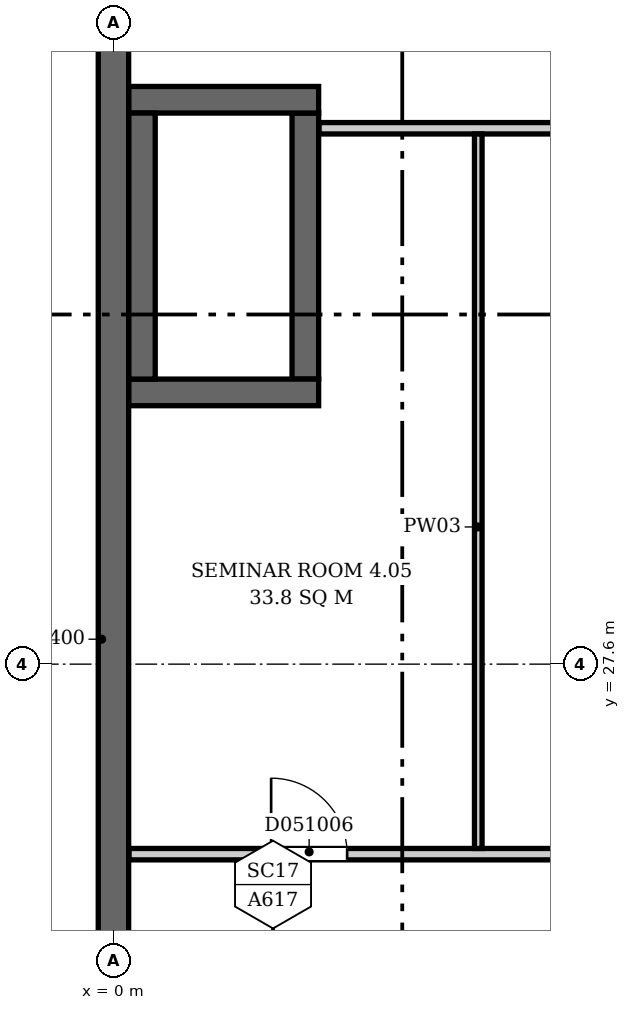
"""IFC4 building model, lengths in metres.
Left out: names, types, materials, properties, quantities, classifications, styles, units other than length and angle.
Written with IfcOpenShell. Run it as: python <this file> out.ifc"""

import sys

from ifc_helpers import new_model, si_unit, direction, frame, frame_2d, origin, place, context, subcontext, project, spatial, rectangle, extrude, element, fill, save


model = new_model("IFC4")
c1 = context("Model", 3, precision=1e-05, world=origin(), true_north=direction((0.0, 1.0)))
c2 = subcontext(c1, "Body", "Model", "MODEL_VIEW")
j1 = project(units=[si_unit("LENGTHUNIT", "METRE"), si_unit("PLANEANGLEUNIT", "RADIAN")], contexts=[c1])
p1 = place(None, origin())
s1 = spatial("IfcSite", under=j1, at=p1, CompositionType="ELEMENT")
p2 = place(p1, origin())
s2 = spatial("IfcBuilding", under=s1, at=p2, CompositionType="ELEMENT")
p3 = place(p2, frame((0.0, 0.0, 26.7)))
s3 = spatial("IfcBuildingStorey", under=s2, at=p3, CompositionType="ELEMENT", Elevation=26.7)
p4 = place(p3, frame((0.0, -0.2, 0.0), z_axis=(0.0, 0.0, 1.0), x_axis=(0.0, 1.0, 0.0)))
e1 = element("IfcWall", 1, at=p4, inside=s3, PredefinedType="SHEAR", context=c2, shape_type="SweptSolid", body=[
    extrude(rectangle(XDim=46.88, YDim=0.4, at=frame_2d((23.44, 0.0))), origin(), (0.0, 0.0, 1.0), 5.2),
])
for number, where, z_axis, x_axis in (
    (2, (0.2, 31.175, 0.0), (0.0, 0.0, 1.0), (1.0, 0.0, 0.0)),
    (3, (0.2, 35.025, 0.0), (0.0, 0.0, 1.0), (1.0, 0.0, 0.0)),
):
    element("IfcWall", number, at=place(p3, frame(where, z_axis=z_axis, x_axis=x_axis)), inside=s3, PredefinedType="SHEAR", context=c2, shape_type="SweptSolid", body=[
        extrude(rectangle(XDim=2.5, YDim=0.35, at=frame_2d((1.25, 0.0))), origin(), (0.0, 0.0, 1.0), 5.2),
    ])
for number, where, z_axis, x_axis in (
    (4, (0.375, 31.35, 0.0), (0.0, 0.0, 1.0), (0.0, 1.0, 0.0)),
    (5, (2.525, 31.35, 0.0), (0.0, 0.0, 1.0), (0.0, 1.0, 0.0)),
):
    element("IfcWall", number, at=place(p3, frame(where, z_axis=z_axis, x_axis=x_axis)), inside=s3, PredefinedType="SHEAR", context=c2, shape_type="SweptSolid", body=[
        extrude(rectangle(XDim=3.5, YDim=0.35, at=frame_2d((1.75, 0.0))), origin(), (0.0, 0.0, 1.0), 5.2),
    ])
p5 = place(p3, frame((0.206, 25.1, 0.0), z_axis=(0.0, 0.0, 1.0), x_axis=(1.0, 0.0, 0.0)))
e6 = element("IfcWall", 6, at=p5, inside=s3, PredefinedType="PARTITIONING", context=c2, shape_type="SweptSolid", body=[
    extrude(rectangle(XDim=9.469, YDim=0.15, at=frame_2d((4.734, 0.0))), origin(), (0.0, 0.0, 1.0), 4.85),
])
p6 = place(p5, frame((1.869, 0.0, 0.0)))
e7 = element("IfcOpeningElement", 7, at=p6, cuts=e6, PredefinedType="OPENING", context=c2, shape_type="SweptSolid", body=[
    extrude(rectangle(XDim=1.0, YDim=2.1, at=frame_2d((0.5, 1.05))), frame((0.0, 0.085, 0.0), z_axis=(0.0, -1.0, 0.0), x_axis=(1.0, 0.0, 0.0)), (0.0, 0.0, 1.0), 0.17),
])
p7 = place(p5, frame((6.459, 0.0, 0.0)))
e8 = element("IfcOpeningElement", 8, at=p7, cuts=e6, PredefinedType="OPENING", context=c2, shape_type="SweptSolid", body=[
    extrude(rectangle(XDim=1.0, YDim=2.1, at=frame_2d((0.5, 1.05))), frame((0.0, 0.085, 0.0), z_axis=(0.0, -1.0, 0.0), x_axis=(1.0, 0.0, 0.0)), (0.0, 0.0, 1.0), 0.17),
])
p8 = place(p3, frame((2.706, 34.65, 0.0), z_axis=(0.0, 0.0, 1.0), x_axis=(1.0, 0.0, 0.0)))
e9 = element("IfcWall", 9, at=p8, inside=s3, PredefinedType="PARTITIONING", context=c2, shape_type="SweptSolid", body=[
    extrude(rectangle(XDim=7.688, YDim=0.15, at=frame_2d((3.844, 0.0))), origin(), (0.0, 0.0, 1.0), 4.85),
])
p9 = place(p3, frame((4.8, 25.175, 0.0), z_axis=(0.0, 0.0, 1.0), x_axis=(0.0, 1.0, 0.0)))
e10 = element("IfcWall", 10, at=p9, inside=s3, PredefinedType="PARTITIONING", context=c2, shape_type="SweptSolid", body=[
    extrude(rectangle(XDim=9.4, YDim=0.1, at=frame_2d((4.7, 0.0))), origin(), (0.0, 0.0, 1.0), 4.85),
])
p10 = place(p6, origin())
e11 = element("IfcDoor", 11, at=p10, inside=s3, OperationType="SINGLE_SWING_LEFT", PredefinedType="DOOR", context=c2, shape_type="SweptSolid", body=[
    extrude(rectangle(XDim=1.0, YDim=2.1, at=frame_2d((0.5, 1.05))), frame((0.0, 0.025, 0.0), z_axis=(0.0, -1.0, 0.0), x_axis=(1.0, 0.0, 0.0)), (0.0, 0.0, 1.0), 0.05),
])
fill(e7, e11)
save(model, sys.argv[1])
